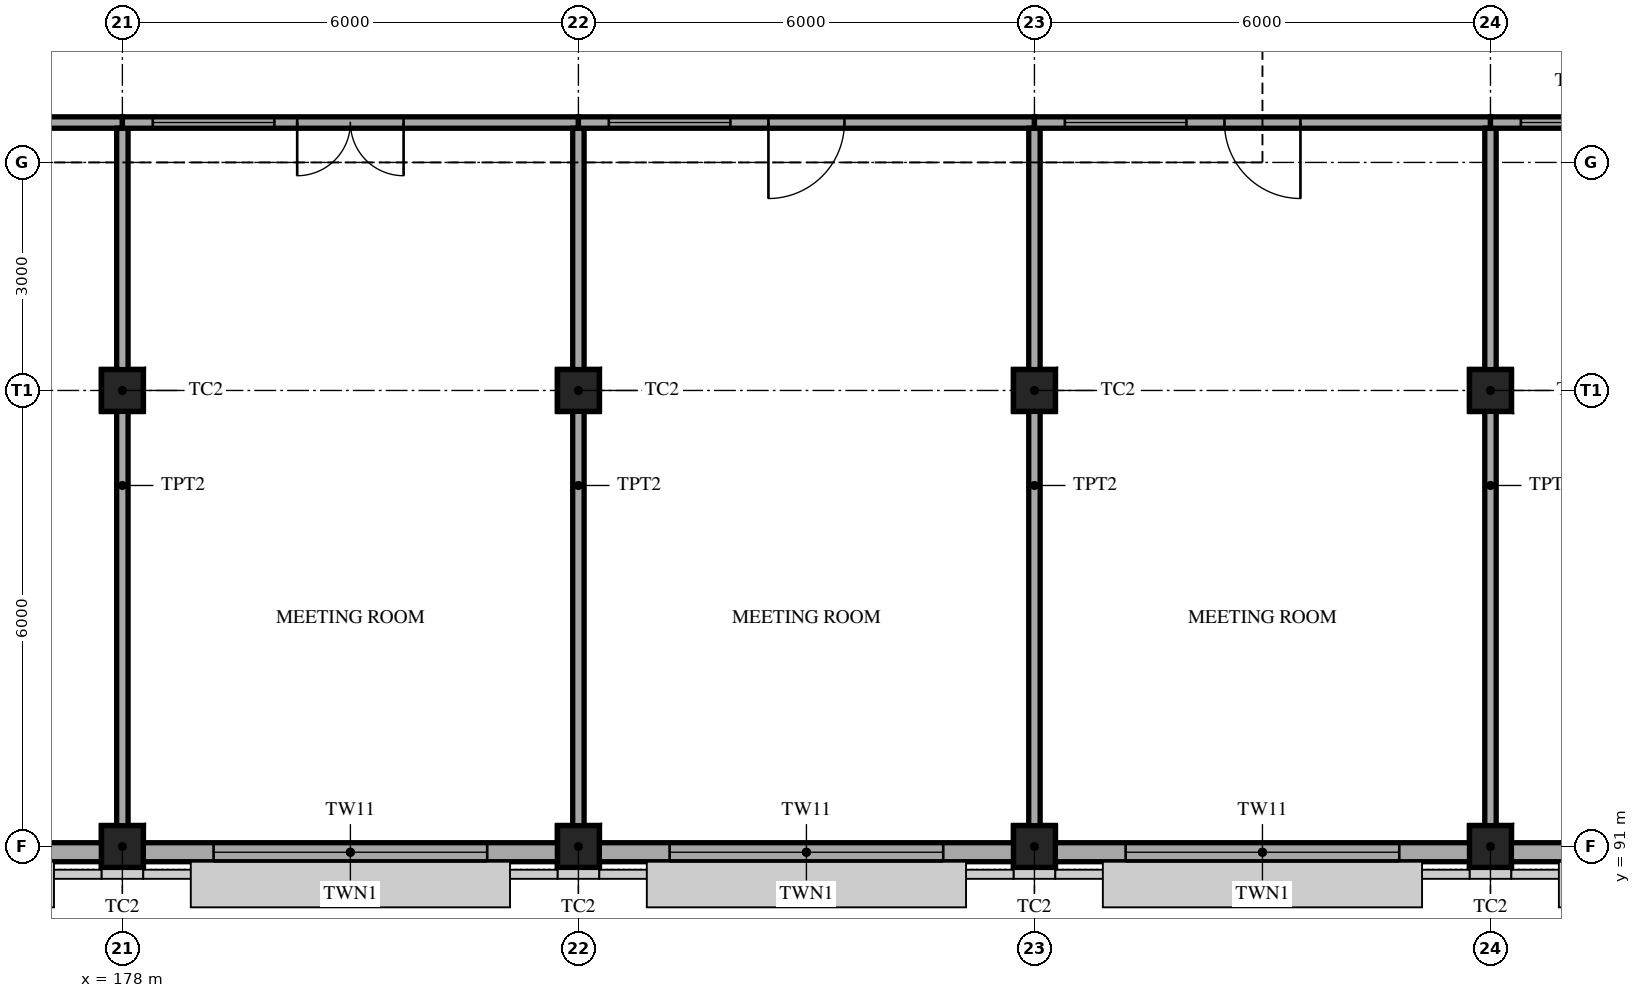
"""IFC4 building model, lengths in metres.
Left out: names, types, materials, properties, quantities, classifications, styles, units other than length and angle.
Written with IfcOpenShell. Run it as: python <this file> out.ifc"""

import sys

from ifc_helpers import new_model, si_unit, direction, frame, frame_2d, origin, origin_2d, place, context, subcontext, project, spatial, polyline, rectangle, hollow_rectangle, outline, extrude, element, fill, save


model = new_model("IFC4")
c1 = context("Model", 3, precision=1e-05, world=origin(), true_north=direction((0.0, 1.0)))
c2 = subcontext(c1, "Body", "Model", "MODEL_VIEW")
j1 = project(units=[si_unit("LENGTHUNIT", "METRE"), si_unit("PLANEANGLEUNIT", "RADIAN")], contexts=[c1])
p1 = place(None, origin())
s1 = spatial("IfcSite", under=j1, at=p1, CompositionType="ELEMENT")
p2 = place(p1, origin())
s2 = spatial("IfcBuilding", under=s1, at=p2, CompositionType="ELEMENT")
p3 = place(p2, frame((0.0, 0.0, 10.0)))
s3 = spatial("IfcBuildingStorey", under=s2, at=p3, CompositionType="ELEMENT", Elevation=10.0)
for number, where, z_axis, x_axis in (
    (1, (178.0, 91.0, 0.0), (0.0, 0.0, 1.0), (1.0, 0.0, 0.0)),
    (2, (184.0, 91.0, 0.0), (0.0, 0.0, 1.0), (1.0, 0.0, 0.0)),
    (3, (190.0, 91.0, 0.0), (0.0, 0.0, 1.0), (1.0, 0.0, 0.0)),
    (4, (196.0, 91.0, 0.0), (0.0, 0.0, 1.0), (1.0, 0.0, 0.0)),
    (5, (178.0, 97.0, 0.0), (0.0, 0.0, 1.0), (1.0, 0.0, 0.0)),
    (6, (184.0, 97.0, 0.0), (0.0, 0.0, 1.0), (1.0, 0.0, 0.0)),
    (7, (190.0, 97.0, 0.0), (0.0, 0.0, 1.0), (1.0, 0.0, 0.0)),
    (8, (196.0, 97.0, 0.0), (0.0, 0.0, 1.0), (1.0, 0.0, 0.0)),
):
    element("IfcColumn", number, at=place(p3, frame(where, z_axis=z_axis, x_axis=x_axis)), inside=s3, PredefinedType="COLUMN", context=c2, shape_type="SweptSolid", body=[
        extrude(hollow_rectangle(XDim=0.55, YDim=0.55, WallThickness=0.032, at=origin_2d()), origin(), (0.0, 0.0, 1.0), 5.0),
    ])
p4 = place(p3, frame((172.275, 90.925, 0.0), z_axis=(0.0, 0.0, 1.0), x_axis=(1.0, 0.0, 0.0)))
e9 = element("IfcWall", 9, at=p4, inside=s3, PredefinedType="SOLIDWALL", context=c2, shape_type="SweptSolid", body=[
    extrude(rectangle(XDim=5.45, YDim=0.25, at=frame_2d((2.725, 0.0))), origin(), (0.0, 0.0, 1.0), 4.35),
])
p5 = place(p4, frame((0.925, 0.0, 0.9)))
e10 = element("IfcOpeningElement", 10, at=p5, cuts=e9, PredefinedType="OPENING", context=c2, shape_type="SweptSolid", body=[
    extrude(rectangle(XDim=3.6, YDim=2.4, at=frame_2d((1.8, 1.2))), frame((0.0, 0.135, 0.0), z_axis=(0.0, -1.0, 0.0), x_axis=(1.0, 0.0, 0.0)), (0.0, 0.0, 1.0), 0.27),
])
p6 = place(p3, frame((178.275, 90.925, 0.0), z_axis=(0.0, 0.0, 1.0), x_axis=(1.0, 0.0, 0.0)))
e11 = element("IfcWall", 11, at=p6, inside=s3, PredefinedType="SOLIDWALL", context=c2, shape_type="SweptSolid", body=[
    extrude(rectangle(XDim=5.45, YDim=0.25, at=frame_2d((2.725, 0.0))), origin(), (0.0, 0.0, 1.0), 4.35),
])
p7 = place(p6, frame((0.925, 0.0, 0.9)))
e12 = element("IfcOpeningElement", 12, at=p7, cuts=e11, PredefinedType="OPENING", context=c2, shape_type="SweptSolid", body=[
    extrude(rectangle(XDim=3.6, YDim=2.4, at=frame_2d((1.8, 1.2))), frame((0.0, 0.135, 0.0), z_axis=(0.0, -1.0, 0.0), x_axis=(1.0, 0.0, 0.0)), (0.0, 0.0, 1.0), 0.27),
])
p8 = place(p3, frame((184.275, 90.925, 0.0), z_axis=(0.0, 0.0, 1.0), x_axis=(1.0, 0.0, 0.0)))
e13 = element("IfcWall", 13, at=p8, inside=s3, PredefinedType="SOLIDWALL", context=c2, shape_type="SweptSolid", body=[
    extrude(rectangle(XDim=5.45, YDim=0.25, at=frame_2d((2.725, 0.0))), origin(), (0.0, 0.0, 1.0), 4.35),
])
p9 = place(p8, frame((0.925, 0.0, 0.9)))
e14 = element("IfcOpeningElement", 14, at=p9, cuts=e13, PredefinedType="OPENING", context=c2, shape_type="SweptSolid", body=[
    extrude(rectangle(XDim=3.6, YDim=2.4, at=frame_2d((1.8, 1.2))), frame((0.0, 0.135, 0.0), z_axis=(0.0, -1.0, 0.0), x_axis=(1.0, 0.0, 0.0)), (0.0, 0.0, 1.0), 0.27),
])
p10 = place(p3, frame((190.275, 90.925, 0.0), z_axis=(0.0, 0.0, 1.0), x_axis=(1.0, 0.0, 0.0)))
e15 = element("IfcWall", 15, at=p10, inside=s3, PredefinedType="SOLIDWALL", context=c2, shape_type="SweptSolid", body=[
    extrude(rectangle(XDim=5.45, YDim=0.25, at=frame_2d((2.725, 0.0))), origin(), (0.0, 0.0, 1.0), 4.35),
])
p11 = place(p10, frame((0.925, 0.0, 0.9)))
e16 = element("IfcOpeningElement", 16, at=p11, cuts=e15, PredefinedType="OPENING", context=c2, shape_type="SweptSolid", body=[
    extrude(rectangle(XDim=3.6, YDim=2.4, at=frame_2d((1.8, 1.2))), frame((0.0, 0.135, 0.0), z_axis=(0.0, -1.0, 0.0), x_axis=(1.0, 0.0, 0.0)), (0.0, 0.0, 1.0), 0.27),
])
p12 = place(p3, frame((196.275, 90.925, 0.0), z_axis=(0.0, 0.0, 1.0), x_axis=(1.0, 0.0, 0.0)))
e17 = element("IfcWall", 17, at=p12, inside=s3, PredefinedType="SOLIDWALL", context=c2, shape_type="SweptSolid", body=[
    extrude(rectangle(XDim=5.45, YDim=0.25, at=frame_2d((2.725, 0.0))), origin(), (0.0, 0.0, 1.0), 4.35),
])
p13 = place(p12, frame((0.925, 0.0, 0.9)))
e18 = element("IfcOpeningElement", 18, at=p13, cuts=e17, PredefinedType="OPENING", context=c2, shape_type="SweptSolid", body=[
    extrude(rectangle(XDim=3.6, YDim=2.4, at=frame_2d((1.8, 1.2))), frame((0.0, 0.135, 0.0), z_axis=(0.0, -1.0, 0.0), x_axis=(1.0, 0.0, 0.0)), (0.0, 0.0, 1.0), 0.27),
])
p14 = place(p3, frame((172.0, 100.525, 0.0), z_axis=(0.0, 0.0, 1.0), x_axis=(1.0, 0.0, 0.0)))
e19 = element("IfcWall", 19, at=p14, inside=s3, PredefinedType="PARTITIONING", context=c2, shape_type="SweptSolid", body=[
    extrude(rectangle(XDim=6.0, YDim=0.15, at=frame_2d((3.0, 0.0))), origin(), (0.0, 0.0, 1.0), 4.2),
])
p15 = place(p14, frame((0.4, 0.0, 0.9)))
e20 = element("IfcOpeningElement", 20, at=p15, cuts=e19, PredefinedType="OPENING", context=c2, shape_type="SweptSolid", body=[
    extrude(rectangle(XDim=1.6, YDim=1.2, at=frame_2d((0.8, 0.6))), frame((0.0, 0.085, 0.0), z_axis=(0.0, -1.0, 0.0), x_axis=(1.0, 0.0, 0.0)), (0.0, 0.0, 1.0), 0.17),
])
p16 = place(p14, frame((2.5, 0.0, 0.0)))
e21 = element("IfcOpeningElement", 21, at=p16, cuts=e19, PredefinedType="OPENING", context=c2, shape_type="SweptSolid", body=[
    extrude(rectangle(XDim=1.0, YDim=2.1, at=frame_2d((0.5, 1.05))), frame((0.0, 0.085, 0.0), z_axis=(0.0, -1.0, 0.0), x_axis=(1.0, 0.0, 0.0)), (0.0, 0.0, 1.0), 0.17),
])
p17 = place(p3, frame((178.0, 91.05, 0.0), z_axis=(0.0, 0.0, 1.0), x_axis=(0.0, 1.0, 0.0)))
e22 = element("IfcWall", 22, at=p17, inside=s3, PredefinedType="PARTITIONING", context=c2, shape_type="SweptSolid", body=[
    extrude(rectangle(XDim=9.4, YDim=0.15, at=frame_2d((4.7, 0.0))), origin(), (0.0, 0.0, 1.0), 4.2),
])
p18 = place(p3, frame((178.0, 100.525, 0.0), z_axis=(0.0, 0.0, 1.0), x_axis=(1.0, 0.0, 0.0)))
e23 = element("IfcWall", 23, at=p18, inside=s3, PredefinedType="PARTITIONING", context=c2, shape_type="SweptSolid", body=[
    extrude(rectangle(XDim=6.0, YDim=0.15, at=frame_2d((3.0, 0.0))), origin(), (0.0, 0.0, 1.0), 4.2),
])
p19 = place(p18, frame((0.4, 0.0, 0.9)))
e24 = element("IfcOpeningElement", 24, at=p19, cuts=e23, PredefinedType="OPENING", context=c2, shape_type="SweptSolid", body=[
    extrude(rectangle(XDim=1.6, YDim=1.2, at=frame_2d((0.8, 0.6))), frame((0.0, 0.085, 0.0), z_axis=(0.0, -1.0, 0.0), x_axis=(1.0, 0.0, 0.0)), (0.0, 0.0, 1.0), 0.17),
])
p20 = place(p18, frame((2.3, 0.0, 0.0)))
e25 = element("IfcOpeningElement", 25, at=p20, cuts=e23, PredefinedType="OPENING", context=c2, shape_type="SweptSolid", body=[
    extrude(rectangle(XDim=1.4, YDim=2.1, at=frame_2d((0.7, 1.05))), frame((0.0, 0.085, 0.0), z_axis=(0.0, -1.0, 0.0), x_axis=(1.0, 0.0, 0.0)), (0.0, 0.0, 1.0), 0.17),
])
p21 = place(p3, frame((184.0, 91.05, 0.0), z_axis=(0.0, 0.0, 1.0), x_axis=(0.0, 1.0, 0.0)))
e26 = element("IfcWall", 26, at=p21, inside=s3, PredefinedType="PARTITIONING", context=c2, shape_type="SweptSolid", body=[
    extrude(rectangle(XDim=9.4, YDim=0.15, at=frame_2d((4.7, 0.0))), origin(), (0.0, 0.0, 1.0), 4.2),
])
p22 = place(p3, frame((184.0, 100.525, 0.0), z_axis=(0.0, 0.0, 1.0), x_axis=(1.0, 0.0, 0.0)))
e27 = element("IfcWall", 27, at=p22, inside=s3, PredefinedType="PARTITIONING", context=c2, shape_type="SweptSolid", body=[
    extrude(rectangle(XDim=6.0, YDim=0.15, at=frame_2d((3.0, 0.0))), origin(), (0.0, 0.0, 1.0), 4.2),
])
p23 = place(p22, frame((0.4, 0.0, 0.9)))
e28 = element("IfcOpeningElement", 28, at=p23, cuts=e27, PredefinedType="OPENING", context=c2, shape_type="SweptSolid", body=[
    extrude(rectangle(XDim=1.6, YDim=1.2, at=frame_2d((0.8, 0.6))), frame((0.0, 0.085, 0.0), z_axis=(0.0, -1.0, 0.0), x_axis=(1.0, 0.0, 0.0)), (0.0, 0.0, 1.0), 0.17),
])
p24 = place(p22, frame((2.5, 0.0, 0.0)))
e29 = element("IfcOpeningElement", 29, at=p24, cuts=e27, PredefinedType="OPENING", context=c2, shape_type="SweptSolid", body=[
    extrude(rectangle(XDim=1.0, YDim=2.1, at=frame_2d((0.5, 1.05))), frame((0.0, 0.085, 0.0), z_axis=(0.0, -1.0, 0.0), x_axis=(1.0, 0.0, 0.0)), (0.0, 0.0, 1.0), 0.17),
])
p25 = place(p3, frame((190.0, 91.05, 0.0), z_axis=(0.0, 0.0, 1.0), x_axis=(0.0, 1.0, 0.0)))
e30 = element("IfcWall", 30, at=p25, inside=s3, PredefinedType="PARTITIONING", context=c2, shape_type="SweptSolid", body=[
    extrude(rectangle(XDim=9.4, YDim=0.15, at=frame_2d((4.7, 0.0))), origin(), (0.0, 0.0, 1.0), 4.2),
])
p26 = place(p3, frame((190.0, 100.525, 0.0), z_axis=(0.0, 0.0, 1.0), x_axis=(1.0, 0.0, 0.0)))
e31 = element("IfcWall", 31, at=p26, inside=s3, PredefinedType="PARTITIONING", context=c2, shape_type="SweptSolid", body=[
    extrude(rectangle(XDim=6.0, YDim=0.15, at=frame_2d((3.0, 0.0))), origin(), (0.0, 0.0, 1.0), 4.2),
])
p27 = place(p26, frame((0.4, 0.0, 0.9)))
e32 = element("IfcOpeningElement", 32, at=p27, cuts=e31, PredefinedType="OPENING", context=c2, shape_type="SweptSolid", body=[
    extrude(rectangle(XDim=1.6, YDim=1.2, at=frame_2d((0.8, 0.6))), frame((0.0, 0.085, 0.0), z_axis=(0.0, -1.0, 0.0), x_axis=(1.0, 0.0, 0.0)), (0.0, 0.0, 1.0), 0.17),
])
p28 = place(p26, frame((2.5, 0.0, 0.0)))
e33 = element("IfcOpeningElement", 33, at=p28, cuts=e31, PredefinedType="OPENING", context=c2, shape_type="SweptSolid", body=[
    extrude(rectangle(XDim=1.0, YDim=2.1, at=frame_2d((0.5, 1.05))), frame((0.0, 0.085, 0.0), z_axis=(0.0, -1.0, 0.0), x_axis=(1.0, 0.0, 0.0)), (0.0, 0.0, 1.0), 0.17),
])
p29 = place(p3, frame((196.0, 91.05, 0.0), z_axis=(0.0, 0.0, 1.0), x_axis=(0.0, 1.0, 0.0)))
e34 = element("IfcWall", 34, at=p29, inside=s3, PredefinedType="PARTITIONING", context=c2, shape_type="SweptSolid", body=[
    extrude(rectangle(XDim=9.4, YDim=0.15, at=frame_2d((4.7, 0.0))), origin(), (0.0, 0.0, 1.0), 4.2),
])
p30 = place(p3, frame((196.0, 100.525, 0.0), z_axis=(0.0, 0.0, 1.0), x_axis=(1.0, 0.0, 0.0)))
e35 = element("IfcWall", 35, at=p30, inside=s3, PredefinedType="PARTITIONING", context=c2, shape_type="SweptSolid", body=[
    extrude(rectangle(XDim=5.95, YDim=0.15, at=frame_2d((2.975, 0.0))), origin(), (0.0, 0.0, 1.0), 4.2),
])
p31 = place(p30, frame((0.4, 0.0, 0.9)))
e36 = element("IfcOpeningElement", 36, at=p31, cuts=e35, PredefinedType="OPENING", context=c2, shape_type="SweptSolid", body=[
    extrude(rectangle(XDim=1.6, YDim=1.2, at=frame_2d((0.8, 0.6))), frame((0.0, 0.085, 0.0), z_axis=(0.0, -1.0, 0.0), x_axis=(1.0, 0.0, 0.0)), (0.0, 0.0, 1.0), 0.17),
])
p32 = place(p30, frame((2.512, 0.0, 0.0)))
e37 = element("IfcOpeningElement", 37, at=p32, cuts=e35, PredefinedType="OPENING", context=c2, shape_type="SweptSolid", body=[
    extrude(rectangle(XDim=1.0, YDim=2.1, at=frame_2d((0.5, 1.05))), frame((0.0, 0.085, 0.0), z_axis=(0.0, -1.0, 0.0), x_axis=(1.0, 0.0, 0.0)), (0.0, 0.0, 1.0), 0.17),
])
p33 = place(p7, origin())
e38 = element("IfcWindow", 38, at=p33, inside=s3, PartitioningType="TRIPLE_PANEL_VERTICAL", PredefinedType="WINDOW", context=c2, shape_type="SweptSolid", body=[
    extrude(outline(polyline([(0.0, 0.0), (3.6, 0.0), (3.6, 2.4), (0.0, 2.4), (0.0, 0.0)]), holes=[polyline([(0.06, 0.06), (0.96, 0.06), (0.96, 2.34), (0.06, 2.34), (0.06, 0.06)]), polyline([(1.06, 0.06), (2.54, 0.06), (2.54, 2.34), (1.06, 2.34), (1.06, 0.06)]), polyline([(2.64, 0.06), (3.54, 0.06), (3.54, 2.34), (2.64, 2.34), (2.64, 0.06)])]), frame((0.0, 0.03, 0.0), z_axis=(0.0, -1.0, 0.0), x_axis=(1.0, 0.0, 0.0)), (0.0, 0.0, 1.0), 0.06),
    extrude(rectangle(XDim=0.924, YDim=2.304, at=frame_2d((0.51, 1.2))), frame((0.0, 0.01, 0.0), z_axis=(0.0, -1.0, 0.0), x_axis=(1.0, 0.0, 0.0)), (0.0, 0.0, 1.0), 0.02),
    extrude(rectangle(XDim=1.504, YDim=2.304, at=frame_2d((1.8, 1.2))), frame((0.0, 0.01, 0.0), z_axis=(0.0, -1.0, 0.0), x_axis=(1.0, 0.0, 0.0)), (0.0, 0.0, 1.0), 0.02),
    extrude(rectangle(XDim=0.924, YDim=2.304, at=frame_2d((3.09, 1.2))), frame((0.0, 0.01, 0.0), z_axis=(0.0, -1.0, 0.0), x_axis=(1.0, 0.0, 0.0)), (0.0, 0.0, 1.0), 0.02),
])
fill(e12, e38)
p34 = place(p9, origin())
e39 = element("IfcWindow", 39, at=p34, inside=s3, PartitioningType="TRIPLE_PANEL_VERTICAL", PredefinedType="WINDOW", context=c2, shape_type="SweptSolid", body=[
    extrude(outline(polyline([(0.0, 0.0), (3.6, 0.0), (3.6, 2.4), (0.0, 2.4), (0.0, 0.0)]), holes=[polyline([(0.06, 0.06), (0.96, 0.06), (0.96, 2.34), (0.06, 2.34), (0.06, 0.06)]), polyline([(1.06, 0.06), (2.54, 0.06), (2.54, 2.34), (1.06, 2.34), (1.06, 0.06)]), polyline([(2.64, 0.06), (3.54, 0.06), (3.54, 2.34), (2.64, 2.34), (2.64, 0.06)])]), frame((0.0, 0.03, 0.0), z_axis=(0.0, -1.0, 0.0), x_axis=(1.0, 0.0, 0.0)), (0.0, 0.0, 1.0), 0.06),
    extrude(rectangle(XDim=0.924, YDim=2.304, at=frame_2d((0.51, 1.2))), frame((0.0, 0.01, 0.0), z_axis=(0.0, -1.0, 0.0), x_axis=(1.0, 0.0, 0.0)), (0.0, 0.0, 1.0), 0.02),
    extrude(rectangle(XDim=1.504, YDim=2.304, at=frame_2d((1.8, 1.2))), frame((0.0, 0.01, 0.0), z_axis=(0.0, -1.0, 0.0), x_axis=(1.0, 0.0, 0.0)), (0.0, 0.0, 1.0), 0.02),
    extrude(rectangle(XDim=0.924, YDim=2.304, at=frame_2d((3.09, 1.2))), frame((0.0, 0.01, 0.0), z_axis=(0.0, -1.0, 0.0), x_axis=(1.0, 0.0, 0.0)), (0.0, 0.0, 1.0), 0.02),
])
fill(e14, e39)
p35 = place(p11, origin())
e40 = element("IfcWindow", 40, at=p35, inside=s3, PartitioningType="TRIPLE_PANEL_VERTICAL", PredefinedType="WINDOW", context=c2, shape_type="SweptSolid", body=[
    extrude(outline(polyline([(0.0, 0.0), (3.6, 0.0), (3.6, 2.4), (0.0, 2.4), (0.0, 0.0)]), holes=[polyline([(0.06, 0.06), (0.96, 0.06), (0.96, 2.34), (0.06, 2.34), (0.06, 0.06)]), polyline([(1.06, 0.06), (2.54, 0.06), (2.54, 2.34), (1.06, 2.34), (1.06, 0.06)]), polyline([(2.64, 0.06), (3.54, 0.06), (3.54, 2.34), (2.64, 2.34), (2.64, 0.06)])]), frame((0.0, 0.03, 0.0), z_axis=(0.0, -1.0, 0.0), x_axis=(1.0, 0.0, 0.0)), (0.0, 0.0, 1.0), 0.06),
    extrude(rectangle(XDim=0.924, YDim=2.304, at=frame_2d((0.51, 1.2))), frame((0.0, 0.01, 0.0), z_axis=(0.0, -1.0, 0.0), x_axis=(1.0, 0.0, 0.0)), (0.0, 0.0, 1.0), 0.02),
    extrude(rectangle(XDim=1.504, YDim=2.304, at=frame_2d((1.8, 1.2))), frame((0.0, 0.01, 0.0), z_axis=(0.0, -1.0, 0.0), x_axis=(1.0, 0.0, 0.0)), (0.0, 0.0, 1.0), 0.02),
    extrude(rectangle(XDim=0.924, YDim=2.304, at=frame_2d((3.09, 1.2))), frame((0.0, 0.01, 0.0), z_axis=(0.0, -1.0, 0.0), x_axis=(1.0, 0.0, 0.0)), (0.0, 0.0, 1.0), 0.02),
])
fill(e16, e40)
p36 = place(p19, origin())
e41 = element("IfcWindow", 41, at=p36, inside=s3, PartitioningType="SINGLE_PANEL", PredefinedType="WINDOW", context=c2, shape_type="SweptSolid", body=[
    extrude(rectangle(XDim=1.6, YDim=1.2, at=frame_2d((0.8, 0.6))), frame((0.0, 0.03, 0.0), z_axis=(0.0, -1.0, 0.0), x_axis=(1.0, 0.0, 0.0)), (0.0, 0.0, 1.0), 0.06),
])
fill(e24, e41)
p37 = place(p23, origin())
e42 = element("IfcWindow", 42, at=p37, inside=s3, PartitioningType="SINGLE_PANEL", PredefinedType="WINDOW", context=c2, shape_type="SweptSolid", body=[
    extrude(rectangle(XDim=1.6, YDim=1.2, at=frame_2d((0.8, 0.6))), frame((0.0, 0.03, 0.0), z_axis=(0.0, -1.0, 0.0), x_axis=(1.0, 0.0, 0.0)), (0.0, 0.0, 1.0), 0.06),
])
fill(e28, e42)
p38 = place(p27, origin())
e43 = element("IfcWindow", 43, at=p38, inside=s3, PartitioningType="SINGLE_PANEL", PredefinedType="WINDOW", context=c2, shape_type="SweptSolid", body=[
    extrude(rectangle(XDim=1.6, YDim=1.2, at=frame_2d((0.8, 0.6))), frame((0.0, 0.03, 0.0), z_axis=(0.0, -1.0, 0.0), x_axis=(1.0, 0.0, 0.0)), (0.0, 0.0, 1.0), 0.06),
])
fill(e32, e43)
p39 = place(p31, origin())
e44 = element("IfcWindow", 44, at=p39, inside=s3, PartitioningType="SINGLE_PANEL", PredefinedType="WINDOW", context=c2, shape_type="SweptSolid", body=[
    extrude(rectangle(XDim=1.6, YDim=1.2, at=frame_2d((0.8, 0.6))), frame((0.0, 0.03, 0.0), z_axis=(0.0, -1.0, 0.0), x_axis=(1.0, 0.0, 0.0)), (0.0, 0.0, 1.0), 0.06),
])
fill(e36, e44)
p40 = place(p20, frame((1.4, 0.0, 0.0), z_axis=(0.0, 0.0, 1.0), x_axis=(-1.0, 0.0, 0.0)))
e45 = element("IfcDoor", 45, at=p40, inside=s3, OperationType="DOUBLE_DOOR_SINGLE_SWING", PredefinedType="DOOR", context=c2, shape_type="SweptSolid", body=[
    extrude(rectangle(XDim=1.4, YDim=2.1, at=frame_2d((0.7, 1.05))), frame((0.0, 0.025, 0.0), z_axis=(0.0, -1.0, 0.0), x_axis=(1.0, 0.0, 0.0)), (0.0, 0.0, 1.0), 0.05),
])
fill(e25, e45)
p41 = place(p24, frame((1.0, 0.0, 0.0), z_axis=(0.0, 0.0, 1.0), x_axis=(-1.0, 0.0, 0.0)))
e46 = element("IfcDoor", 46, at=p41, inside=s3, OperationType="SINGLE_SWING_RIGHT", PredefinedType="DOOR", context=c2, shape_type="SweptSolid", body=[
    extrude(rectangle(XDim=1.0, YDim=2.1, at=frame_2d((0.5, 1.05))), frame((0.0, 0.025, 0.0), z_axis=(0.0, -1.0, 0.0), x_axis=(1.0, 0.0, 0.0)), (0.0, 0.0, 1.0), 0.05),
])
fill(e29, e46)
p42 = place(p28, frame((1.0, 0.0, 0.0), z_axis=(0.0, 0.0, 1.0), x_axis=(-1.0, 0.0, 0.0)))
e47 = element("IfcDoor", 47, at=p42, inside=s3, OperationType="SINGLE_SWING_LEFT", PredefinedType="DOOR", context=c2, shape_type="SweptSolid", body=[
    extrude(rectangle(XDim=1.0, YDim=2.1, at=frame_2d((0.5, 1.05))), frame((0.0, 0.025, 0.0), z_axis=(0.0, -1.0, 0.0), x_axis=(1.0, 0.0, 0.0)), (0.0, 0.0, 1.0), 0.05),
])
fill(e33, e47)
save(model, sys.argv[1])
